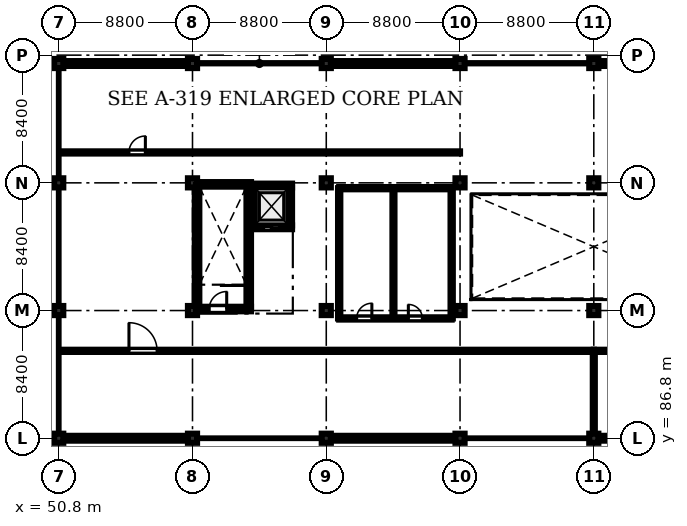
"""IFC4 building model, lengths in metres.
Left out: names, types, materials, properties, quantities, classifications, styles, units other than length and angle.
Written with IfcOpenShell. Run it as: python <this file> out.ifc"""

import sys

from ifc_helpers import new_model, si_unit, direction, frame, frame_2d, origin, origin_2d, place, context, subcontext, project, spatial, rectangle, extrude, element, fill, save


model = new_model("IFC4")
c1 = context("Model", 3, precision=1e-05, world=origin(), true_north=direction((0.0, 1.0)))
c2 = subcontext(c1, "Body", "Model", "MODEL_VIEW")
j1 = project(units=[si_unit("LENGTHUNIT", "METRE"), si_unit("PLANEANGLEUNIT", "RADIAN")], contexts=[c1])
p1 = place(None, origin())
s1 = spatial("IfcSite", under=j1, at=p1, CompositionType="ELEMENT")
p2 = place(p1, origin())
s2 = spatial("IfcBuilding", under=s1, at=p2, CompositionType="ELEMENT")
p3 = place(p2, frame((0.0, 0.0, 14.7)))
s3 = spatial("IfcBuildingStorey", under=s2, at=p3, CompositionType="ELEMENT", Elevation=14.7)
for number, where, z_axis, x_axis in (
    (1, (50.8, 86.8, 0.0), (0.0, 0.0, 1.0), (1.0, 0.0, 0.0)),
    (2, (50.8, 95.2, 0.0), (0.0, 0.0, 1.0), (1.0, 0.0, 0.0)),
    (3, (50.8, 103.6, 0.0), (0.0, 0.0, 1.0), (1.0, 0.0, 0.0)),
    (4, (50.8, 111.45, 0.0), (0.0, 0.0, 1.0), (1.0, 0.0, 0.0)),
    (5, (59.6, 86.8, 0.0), (0.0, 0.0, 1.0), (1.0, 0.0, 0.0)),
    (6, (59.6, 95.2, 0.0), (0.0, 0.0, 1.0), (1.0, 0.0, 0.0)),
    (7, (59.6, 103.6, 0.0), (0.0, 0.0, 1.0), (1.0, 0.0, 0.0)),
    (8, (59.6, 111.45, 0.0), (0.0, 0.0, 1.0), (1.0, 0.0, 0.0)),
    (9, (68.4, 86.8, 0.0), (0.0, 0.0, 1.0), (1.0, 0.0, 0.0)),
    (10, (68.4, 95.2, 0.0), (0.0, 0.0, 1.0), (1.0, 0.0, 0.0)),
    (11, (68.4, 103.6, 0.0), (0.0, 0.0, 1.0), (1.0, 0.0, 0.0)),
    (12, (68.4, 111.45, 0.0), (0.0, 0.0, 1.0), (1.0, 0.0, 0.0)),
    (13, (77.2, 86.8, 0.0), (0.0, 0.0, 1.0), (1.0, 0.0, 0.0)),
    (14, (77.2, 95.2, 0.0), (0.0, 0.0, 1.0), (1.0, 0.0, 0.0)),
    (15, (77.2, 103.6, 0.0), (0.0, 0.0, 1.0), (1.0, 0.0, 0.0)),
    (16, (77.2, 111.45, 0.0), (0.0, 0.0, 1.0), (1.0, 0.0, 0.0)),
    (17, (86.0, 86.8, 0.0), (0.0, 0.0, 1.0), (1.0, 0.0, 0.0)),
    (18, (86.0, 95.2, 0.0), (0.0, 0.0, 1.0), (1.0, 0.0, 0.0)),
    (19, (86.0, 103.6, 0.0), (0.0, 0.0, 1.0), (1.0, 0.0, 0.0)),
    (20, (86.0, 111.45, 0.0), (0.0, 0.0, 1.0), (1.0, 0.0, 0.0)),
):
    element("IfcColumn", number, at=place(p3, frame(where, z_axis=z_axis, x_axis=x_axis)), inside=s3, PredefinedType="COLUMN", context=c2, shape_type="SweptSolid", body=[
        extrude(rectangle(XDim=0.6, YDim=0.6, at=origin_2d()), origin(), (0.0, 0.0, 1.0), 4.5),
    ])
p4 = place(p3, frame((59.75, 95.3, 0.0), z_axis=(0.0, 0.0, 1.0), x_axis=(1.0, 0.0, 0.0)))
e21 = element("IfcWall", 21, at=p4, inside=s3, PredefinedType="SHEAR", context=c2, shape_type="SweptSolid", body=[
    extrude(rectangle(XDim=3.7, YDim=0.3, at=frame_2d((1.85, 0.0))), origin(), (0.0, 0.0, 1.0), 4.5),
])
p5 = place(p4, frame((0.95, 0.0, 0.0)))
e22 = element("IfcOpeningElement", 22, at=p5, cuts=e21, PredefinedType="OPENING", context=c2, shape_type="SweptSolid", body=[
    extrude(rectangle(XDim=1.15, YDim=2.15, at=frame_2d((0.575, 1.075))), frame((0.0, 0.16, 0.0), z_axis=(0.0, -1.0, 0.0), x_axis=(1.0, 0.0, 0.0)), (0.0, 0.0, 1.0), 0.32),
])
p6 = place(p3, frame((59.75, 103.5, 0.0), z_axis=(0.0, 0.0, 1.0), x_axis=(1.0, 0.0, 0.0)))
e23 = element("IfcWall", 23, at=p6, inside=s3, PredefinedType="SHEAR", context=c2, shape_type="SweptSolid", body=[
    extrude(rectangle(XDim=3.7, YDim=0.3, at=frame_2d((1.85, 0.0))), origin(), (0.0, 0.0, 1.0), 4.5),
])
for number, where, z_axis, x_axis in (
    (24, (59.9, 95.45, 0.0), (0.0, 0.0, 1.0), (0.0, 1.0, 0.0)),
    (25, (63.3, 95.45, 0.0), (0.0, 0.0, 1.0), (0.0, 1.0, 0.0)),
):
    element("IfcWall", number, at=place(p3, frame(where, z_axis=z_axis, x_axis=x_axis)), inside=s3, PredefinedType="SHEAR", context=c2, shape_type="SweptSolid", body=[
        extrude(rectangle(XDim=7.9, YDim=0.3, at=frame_2d((3.95, 0.0))), origin(), (0.0, 0.0, 1.0), 4.5),
    ])
p7 = place(p3, frame((63.45, 100.675, 0.0), z_axis=(0.0, 0.0, 1.0), x_axis=(1.0, 0.0, 0.0)))
e26 = element("IfcWall", 26, at=p7, inside=s3, PredefinedType="SHEAR", context=c2, shape_type="SweptSolid", body=[
    extrude(rectangle(XDim=2.7, YDim=0.25, at=frame_2d((1.35, 0.0))), origin(), (0.0, 0.0, 1.0), 4.5),
])
p8 = place(p7, frame((0.83, 0.0, 0.0)))
e27 = element("IfcOpeningElement", 27, at=p8, cuts=e26, PredefinedType="OPENING", context=c2, shape_type="SweptSolid", body=[
    extrude(rectangle(XDim=1.04, YDim=2.15, at=frame_2d((0.52, 1.075))), frame((0.0, 0.135, 0.0), z_axis=(0.0, -1.0, 0.0), x_axis=(1.0, 0.0, 0.0)), (0.0, 0.0, 1.0), 0.27),
])
p9 = place(p3, frame((63.45, 103.425, 0.0), z_axis=(0.0, 0.0, 1.0), x_axis=(1.0, 0.0, 0.0)))
e28 = element("IfcWall", 28, at=p9, inside=s3, PredefinedType="SHEAR", context=c2, shape_type="SweptSolid", body=[
    extrude(rectangle(XDim=2.7, YDim=0.25, at=frame_2d((1.35, 0.0))), origin(), (0.0, 0.0, 1.0), 4.5),
])
for number, where, z_axis, x_axis in (
    (29, (63.575, 100.8, 0.0), (0.0, 0.0, 1.0), (0.0, 1.0, 0.0)),
    (30, (66.025, 100.8, 0.0), (0.0, 0.0, 1.0), (0.0, 1.0, 0.0)),
):
    element("IfcWall", number, at=place(p3, frame(where, z_axis=z_axis, x_axis=x_axis)), inside=s3, PredefinedType="SHEAR", context=c2, shape_type="SweptSolid", body=[
        extrude(rectangle(XDim=2.5, YDim=0.25, at=frame_2d((1.25, 0.0))), origin(), (0.0, 0.0, 1.0), 4.5),
    ])
p10 = place(p3, frame((51.1, 111.45, 0.0), z_axis=(0.0, 0.0, 1.0), x_axis=(1.0, 0.0, 0.0)))
e31 = element("IfcWall", 31, at=p10, inside=s3, PredefinedType="STANDARD", context=c2, shape_type="SweptSolid", body=[
    extrude(rectangle(XDim=8.2, YDim=0.32, at=frame_2d((4.1, 0.0))), origin(), (0.0, 0.0, 1.0), 4.3),
])
p11 = place(p10, frame((1.1, 0.0, 0.9)))
e32 = element("IfcOpeningElement", 32, at=p11, cuts=e31, PredefinedType="OPENING", context=c2, shape_type="SweptSolid", body=[
    extrude(rectangle(XDim=2.7, YDim=2.2, at=frame_2d((1.35, 1.1))), frame((0.0, 0.17, 0.0), z_axis=(0.0, -1.0, 0.0), x_axis=(1.0, 0.0, 0.0)), (0.0, 0.0, 1.0), 0.34),
])
p12 = place(p10, frame((4.7, 0.0, 0.9)))
e33 = element("IfcOpeningElement", 33, at=p12, cuts=e31, PredefinedType="OPENING", context=c2, shape_type="SweptSolid", body=[
    extrude(rectangle(XDim=2.7, YDim=2.2, at=frame_2d((1.35, 1.1))), frame((0.0, 0.17, 0.0), z_axis=(0.0, -1.0, 0.0), x_axis=(1.0, 0.0, 0.0)), (0.0, 0.0, 1.0), 0.34),
])
p13 = place(p3, frame((59.3, 86.8, 0.0), z_axis=(0.0, 0.0, 1.0), x_axis=(-1.0, 0.0, 0.0)))
e34 = element("IfcWall", 34, at=p13, inside=s3, PredefinedType="STANDARD", context=c2, shape_type="SweptSolid", body=[
    extrude(rectangle(XDim=8.2, YDim=0.32, at=frame_2d((4.1, 0.0))), origin(), (0.0, 0.0, 1.0), 4.125),
])
p14 = place(p13, frame((2.8, 0.0, 0.95)))
e35 = element("IfcOpeningElement", 35, at=p14, cuts=e34, PredefinedType="OPENING", context=c2, shape_type="SweptSolid", body=[
    extrude(rectangle(XDim=2.1, YDim=2.25, at=frame_2d((1.05, 1.125))), frame((0.0, 0.17, 0.0), z_axis=(0.0, -1.0, 0.0), x_axis=(1.0, 0.0, 0.0)), (0.0, 0.0, 1.0), 0.34),
])
p15 = place(p3, frame((68.7, 111.45, 0.0), z_axis=(0.0, 0.0, 1.0), x_axis=(1.0, 0.0, 0.0)))
e36 = element("IfcWall", 36, at=p15, inside=s3, PredefinedType="STANDARD", context=c2, shape_type="SweptSolid", body=[
    extrude(rectangle(XDim=8.2, YDim=0.32, at=frame_2d((4.1, 0.0))), origin(), (0.0, 0.0, 1.0), 4.3),
])
p16 = place(p15, frame((1.1, 0.0, 0.9)))
e37 = element("IfcOpeningElement", 37, at=p16, cuts=e36, PredefinedType="OPENING", context=c2, shape_type="SweptSolid", body=[
    extrude(rectangle(XDim=2.7, YDim=2.2, at=frame_2d((1.35, 1.1))), frame((0.0, 0.17, 0.0), z_axis=(0.0, -1.0, 0.0), x_axis=(1.0, 0.0, 0.0)), (0.0, 0.0, 1.0), 0.34),
])
p17 = place(p15, frame((4.7, 0.0, 0.9)))
e38 = element("IfcOpeningElement", 38, at=p17, cuts=e36, PredefinedType="OPENING", context=c2, shape_type="SweptSolid", body=[
    extrude(rectangle(XDim=2.7, YDim=2.2, at=frame_2d((1.35, 1.1))), frame((0.0, 0.17, 0.0), z_axis=(0.0, -1.0, 0.0), x_axis=(1.0, 0.0, 0.0)), (0.0, 0.0, 1.0), 0.34),
])
p18 = place(p3, frame((76.9, 86.8, 0.0), z_axis=(0.0, 0.0, 1.0), x_axis=(-1.0, 0.0, 0.0)))
e39 = element("IfcWall", 39, at=p18, inside=s3, PredefinedType="STANDARD", context=c2, shape_type="SweptSolid", body=[
    extrude(rectangle(XDim=8.2, YDim=0.32, at=frame_2d((4.1, 0.0))), origin(), (0.0, 0.0, 1.0), 4.125),
])
p19 = place(p18, frame((2.8, 0.0, 0.95)))
e40 = element("IfcOpeningElement", 40, at=p19, cuts=e39, PredefinedType="OPENING", context=c2, shape_type="SweptSolid", body=[
    extrude(rectangle(XDim=2.1, YDim=2.25, at=frame_2d((1.05, 1.125))), frame((0.0, 0.17, 0.0), z_axis=(0.0, -1.0, 0.0), x_axis=(1.0, 0.0, 0.0)), (0.0, 0.0, 1.0), 0.34),
])
p20 = place(p3, frame((86.3, 111.45, 0.0), z_axis=(0.0, 0.0, 1.0), x_axis=(1.0, 0.0, 0.0)))
e41 = element("IfcWall", 41, at=p20, inside=s3, PredefinedType="STANDARD", context=c2, shape_type="SweptSolid", body=[
    extrude(rectangle(XDim=8.2, YDim=0.32, at=frame_2d((4.1, 0.0))), origin(), (0.0, 0.0, 1.0), 4.3),
])
p21 = place(p20, frame((1.1, 0.0, 0.9)))
e42 = element("IfcOpeningElement", 42, at=p21, cuts=e41, PredefinedType="OPENING", context=c2, shape_type="SweptSolid", body=[
    extrude(rectangle(XDim=2.7, YDim=2.2, at=frame_2d((1.35, 1.1))), frame((0.0, 0.17, 0.0), z_axis=(0.0, -1.0, 0.0), x_axis=(1.0, 0.0, 0.0)), (0.0, 0.0, 1.0), 0.34),
])
p22 = place(p20, frame((4.7, 0.0, 0.9)))
e43 = element("IfcOpeningElement", 43, at=p22, cuts=e41, PredefinedType="OPENING", context=c2, shape_type="SweptSolid", body=[
    extrude(rectangle(XDim=2.7, YDim=2.2, at=frame_2d((1.35, 1.1))), frame((0.0, 0.17, 0.0), z_axis=(0.0, -1.0, 0.0), x_axis=(1.0, 0.0, 0.0)), (0.0, 0.0, 1.0), 0.34),
])
p23 = place(p3, frame((94.5, 86.8, 0.0), z_axis=(0.0, 0.0, 1.0), x_axis=(-1.0, 0.0, 0.0)))
e44 = element("IfcWall", 44, at=p23, inside=s3, PredefinedType="STANDARD", context=c2, shape_type="SweptSolid", body=[
    extrude(rectangle(XDim=8.2, YDim=0.32, at=frame_2d((4.1, 0.0))), origin(), (0.0, 0.0, 1.0), 4.125),
])
p24 = place(p23, frame((2.8, 0.0, 0.95)))
e45 = element("IfcOpeningElement", 45, at=p24, cuts=e44, PredefinedType="OPENING", context=c2, shape_type="SweptSolid", body=[
    extrude(rectangle(XDim=2.1, YDim=2.25, at=frame_2d((1.05, 1.125))), frame((0.0, 0.17, 0.0), z_axis=(0.0, -1.0, 0.0), x_axis=(1.0, 0.0, 0.0)), (0.0, 0.0, 1.0), 0.34),
])
p25 = place(p3, frame((69.25, 94.68, 0.0), z_axis=(0.0, 0.0, 1.0), x_axis=(1.0, 0.0, 0.0)))
e46 = element("IfcWall", 46, at=p25, inside=s3, PredefinedType="PARTITIONING", context=c2, shape_type="SweptSolid", body=[
    extrude(rectangle(XDim=7.4, YDim=0.15, at=frame_2d((3.7, 0.0))), origin(), (0.0, 0.0, 1.0), 4.25),
])
p26 = place(p25, frame((1.15, 0.0, 0.0)))
e47 = element("IfcOpeningElement", 47, at=p26, cuts=e46, PredefinedType="OPENING", context=c2, shape_type="SweptSolid", body=[
    extrude(rectangle(XDim=1.0, YDim=2.12, at=frame_2d((0.5, 1.06))), frame((0.0, 0.085, 0.0), z_axis=(0.0, -1.0, 0.0), x_axis=(1.0, 0.0, 0.0)), (0.0, 0.0, 1.0), 0.17),
])
p27 = place(p25, frame((4.55, 0.0, 0.0)))
e48 = element("IfcOpeningElement", 48, at=p27, cuts=e46, PredefinedType="OPENING", context=c2, shape_type="SweptSolid", body=[
    extrude(rectangle(XDim=0.92, YDim=2.1, at=frame_2d((0.46, 1.05))), frame((0.0, 0.085, 0.0), z_axis=(0.0, -1.0, 0.0), x_axis=(1.0, 0.0, 0.0)), (0.0, 0.0, 1.0), 0.17),
])
p28 = place(p3, frame((69.25, 94.68, 0.0), z_axis=(0.0, 0.0, 1.0), x_axis=(0.0, 1.0, 0.0)))
e49 = element("IfcWall", 49, at=p28, inside=s3, PredefinedType="PARTITIONING", context=c2, shape_type="SweptSolid", body=[
    extrude(rectangle(XDim=8.57, YDim=0.15, at=frame_2d((4.285, 0.0))), origin(), (0.0, 0.0, 1.0), 4.25),
])
p29 = place(p3, frame((72.82, 94.68, 0.0), z_axis=(0.0, 0.0, 1.0), x_axis=(0.0, 1.0, 0.0)))
e50 = element("IfcWall", 50, at=p29, inside=s3, PredefinedType="PARTITIONING", context=c2, shape_type="SweptSolid", body=[
    extrude(rectangle(XDim=8.57, YDim=0.135, at=frame_2d((4.285, 0.0))), origin(), (0.0, 0.0, 1.0), 4.25),
])
p30 = place(p3, frame((69.25, 103.25, 0.0), z_axis=(0.0, 0.0, 1.0), x_axis=(1.0, 0.0, 0.0)))
e51 = element("IfcWall", 51, at=p30, inside=s3, PredefinedType="PARTITIONING", context=c2, shape_type="SweptSolid", body=[
    extrude(rectangle(XDim=7.4, YDim=0.15, at=frame_2d((3.7, 0.0))), origin(), (0.0, 0.0, 1.0), 4.25),
])
p31 = place(p3, frame((76.65, 94.68, 0.0), z_axis=(0.0, 0.0, 1.0), x_axis=(0.0, 1.0, 0.0)))
e52 = element("IfcWall", 52, at=p31, inside=s3, PredefinedType="PARTITIONING", context=c2, shape_type="SweptSolid", body=[
    extrude(rectangle(XDim=8.57, YDim=0.15, at=frame_2d((4.285, 0.0))), origin(), (0.0, 0.0, 1.0), 4.25),
])
p32 = place(p3, frame((50.92, 92.55, 0.0), z_axis=(0.0, 0.0, 1.0), x_axis=(1.0, 0.0, 0.0)))
e53 = element("IfcWall", 53, at=p32, inside=s3, PredefinedType="PARTITIONING", context=c2, shape_type="SweptSolid", body=[
    extrude(rectangle(XDim=35.08, YDim=0.145, at=frame_2d((17.54, 0.0))), origin(), (0.0, 0.0, 1.0), 4.25),
])
p33 = place(p32, frame((4.5, 0.0, 0.0)))
e54 = element("IfcOpeningElement", 54, at=p33, cuts=e53, PredefinedType="OPENING", context=c2, shape_type="SweptSolid", body=[
    extrude(rectangle(XDim=1.85, YDim=2.25, at=frame_2d((0.925, 1.125))), frame((0.0, 0.083, 0.0), z_axis=(0.0, -1.0, 0.0), x_axis=(1.0, 0.0, 0.0)), (0.0, 0.0, 1.0), 0.165),
])
p34 = place(p3, frame((86.0, 92.55, 0.0), z_axis=(0.0, 0.0, 1.0), x_axis=(1.0, 0.0, 0.0)))
e55 = element("IfcWall", 55, at=p34, inside=s3, PredefinedType="PARTITIONING", context=c2, shape_type="SweptSolid", body=[
    extrude(rectangle(XDim=35.02, YDim=0.145, at=frame_2d((17.51, 0.0))), origin(), (0.0, 0.0, 1.0), 4.25),
])
p35 = place(p34, frame((4.5, 0.0, 0.0)))
e56 = element("IfcOpeningElement", 56, at=p35, cuts=e55, PredefinedType="OPENING", context=c2, shape_type="SweptSolid", body=[
    extrude(rectangle(XDim=1.85, YDim=2.25, at=frame_2d((0.925, 1.125))), frame((0.0, 0.083, 0.0), z_axis=(0.0, -1.0, 0.0), x_axis=(1.0, 0.0, 0.0)), (0.0, 0.0, 1.0), 0.165),
])
p36 = place(p3, frame((86.0, 86.95, 0.0), z_axis=(0.0, 0.0, 1.0), x_axis=(0.0, 1.0, 0.0)))
e57 = element("IfcWall", 57, at=p36, inside=s3, PredefinedType="PARTITIONING", context=c2, shape_type="SweptSolid", body=[
    extrude(rectangle(XDim=5.6, YDim=0.135, at=frame_2d((2.8, 0.0))), origin(), (0.0, 0.0, 1.0), 4.25),
])
p37 = place(p3, frame((50.92, 105.6, 0.0), z_axis=(0.0, 0.0, 1.0), x_axis=(1.0, 0.0, 0.0)))
e58 = element("IfcWall", 58, at=p37, inside=s3, PredefinedType="PARTITIONING", context=c2, shape_type="SweptSolid", body=[
    extrude(rectangle(XDim=26.28, YDim=0.145, at=frame_2d((13.14, 0.0))), origin(), (0.0, 0.0, 1.0), 4.25),
])
p38 = place(p37, frame((4.5, 0.0, 0.0)))
e59 = element("IfcOpeningElement", 59, at=p38, cuts=e58, PredefinedType="OPENING", context=c2, shape_type="SweptSolid", body=[
    extrude(rectangle(XDim=1.08, YDim=2.15, at=frame_2d((0.54, 1.075))), frame((0.0, 0.083, 0.0), z_axis=(0.0, -1.0, 0.0), x_axis=(1.0, 0.0, 0.0)), (0.0, 0.0, 1.0), 0.165),
])
p39 = place(p11, origin())
e60 = element("IfcWindow", 60, at=p39, inside=s3, PartitioningType="TRIPLE_PANEL_VERTICAL", PredefinedType="WINDOW", context=c2, shape_type="SweptSolid", body=[
    extrude(rectangle(XDim=2.7, YDim=2.2, at=frame_2d((1.35, 1.1))), frame((0.0, 0.03, 0.0), z_axis=(0.0, -1.0, 0.0), x_axis=(1.0, 0.0, 0.0)), (0.0, 0.0, 1.0), 0.06),
])
fill(e32, e60)
p40 = place(p12, origin())
e61 = element("IfcWindow", 61, at=p40, inside=s3, PartitioningType="TRIPLE_PANEL_VERTICAL", PredefinedType="WINDOW", context=c2, shape_type="SweptSolid", body=[
    extrude(rectangle(XDim=2.7, YDim=2.2, at=frame_2d((1.35, 1.1))), frame((0.0, 0.03, 0.0), z_axis=(0.0, -1.0, 0.0), x_axis=(1.0, 0.0, 0.0)), (0.0, 0.0, 1.0), 0.06),
])
fill(e33, e61)
p41 = place(p14, origin())
e62 = element("IfcWindow", 62, at=p41, inside=s3, PartitioningType="DOUBLE_PANEL_VERTICAL", PredefinedType="WINDOW", context=c2, shape_type="SweptSolid", body=[
    extrude(rectangle(XDim=2.1, YDim=2.25, at=frame_2d((1.05, 1.125))), frame((0.0, 0.03, 0.0), z_axis=(0.0, -1.0, 0.0), x_axis=(1.0, 0.0, 0.0)), (0.0, 0.0, 1.0), 0.06),
])
fill(e35, e62)
p42 = place(p16, origin())
e63 = element("IfcWindow", 63, at=p42, inside=s3, PartitioningType="TRIPLE_PANEL_VERTICAL", PredefinedType="WINDOW", context=c2, shape_type="SweptSolid", body=[
    extrude(rectangle(XDim=2.7, YDim=2.2, at=frame_2d((1.35, 1.1))), frame((0.0, 0.03, 0.0), z_axis=(0.0, -1.0, 0.0), x_axis=(1.0, 0.0, 0.0)), (0.0, 0.0, 1.0), 0.06),
])
fill(e37, e63)
p43 = place(p17, origin())
e64 = element("IfcWindow", 64, at=p43, inside=s3, PartitioningType="TRIPLE_PANEL_VERTICAL", PredefinedType="WINDOW", context=c2, shape_type="SweptSolid", body=[
    extrude(rectangle(XDim=2.7, YDim=2.2, at=frame_2d((1.35, 1.1))), frame((0.0, 0.03, 0.0), z_axis=(0.0, -1.0, 0.0), x_axis=(1.0, 0.0, 0.0)), (0.0, 0.0, 1.0), 0.06),
])
fill(e38, e64)
p44 = place(p19, origin())
e65 = element("IfcWindow", 65, at=p44, inside=s3, PartitioningType="DOUBLE_PANEL_VERTICAL", PredefinedType="WINDOW", context=c2, shape_type="SweptSolid", body=[
    extrude(rectangle(XDim=2.1, YDim=2.25, at=frame_2d((1.05, 1.125))), frame((0.0, 0.03, 0.0), z_axis=(0.0, -1.0, 0.0), x_axis=(1.0, 0.0, 0.0)), (0.0, 0.0, 1.0), 0.06),
])
fill(e40, e65)
p45 = place(p26, origin())
e66 = element("IfcDoor", 66, at=p45, inside=s3, OperationType="SINGLE_SWING_RIGHT", PredefinedType="DOOR", context=c2, shape_type="SweptSolid", body=[
    extrude(rectangle(XDim=1.0, YDim=2.12, at=frame_2d((0.5, 1.06))), frame((0.0, 0.025, 0.0), z_axis=(0.0, -1.0, 0.0), x_axis=(1.0, 0.0, 0.0)), (0.0, 0.0, 1.0), 0.05),
])
fill(e47, e66)
p46 = place(p27, origin())
e67 = element("IfcDoor", 67, at=p46, inside=s3, OperationType="SINGLE_SWING_LEFT", PredefinedType="DOOR", context=c2, shape_type="SweptSolid", body=[
    extrude(rectangle(XDim=0.92, YDim=2.1, at=frame_2d((0.46, 1.05))), frame((0.0, 0.025, 0.0), z_axis=(0.0, -1.0, 0.0), x_axis=(1.0, 0.0, 0.0)), (0.0, 0.0, 1.0), 0.05),
])
fill(e48, e67)
p47 = place(p33, origin())
e68 = element("IfcDoor", 68, at=p47, inside=s3, OperationType="SINGLE_SWING_LEFT", PredefinedType="DOOR", context=c2, shape_type="SweptSolid", body=[
    extrude(rectangle(XDim=1.85, YDim=2.25, at=frame_2d((0.925, 1.125))), frame((0.0, 0.025, 0.0), z_axis=(0.0, -1.0, 0.0), x_axis=(1.0, 0.0, 0.0)), (0.0, 0.0, 1.0), 0.05),
])
fill(e54, e68)
p48 = place(p38, origin())
e69 = element("IfcDoor", 69, at=p48, inside=s3, OperationType="SINGLE_SWING_RIGHT", PredefinedType="DOOR", context=c2, shape_type="SweptSolid", body=[
    extrude(rectangle(XDim=1.08, YDim=2.15, at=frame_2d((0.54, 1.075))), frame((0.0, 0.025, 0.0), z_axis=(0.0, -1.0, 0.0), x_axis=(1.0, 0.0, 0.0)), (0.0, 0.0, 1.0), 0.05),
])
fill(e59, e69)
p49 = place(p5, origin())
e70 = element("IfcDoor", 70, at=p49, inside=s3, OperationType="SINGLE_SWING_RIGHT", PredefinedType="DOOR", context=c2, shape_type="SweptSolid", body=[
    extrude(rectangle(XDim=1.15, YDim=2.15, at=frame_2d((0.575, 1.075))), frame((0.0, 0.025, 0.0), z_axis=(0.0, -1.0, 0.0), x_axis=(1.0, 0.0, 0.0)), (0.0, 0.0, 1.0), 0.05),
])
fill(e22, e70)
p50 = place(p8, origin())
e71 = element("IfcDoor", 71, at=p50, inside=s3, OperationType="SLIDING_TO_LEFT", PredefinedType="DOOR", context=c2, shape_type="SweptSolid", body=[
    extrude(rectangle(XDim=1.04, YDim=2.15, at=frame_2d((0.52, 1.075))), frame((0.0, 0.025, 0.0), z_axis=(0.0, -1.0, 0.0), x_axis=(1.0, 0.0, 0.0)), (0.0, 0.0, 1.0), 0.05),
])
fill(e27, e71)
save(model, sys.argv[1])
